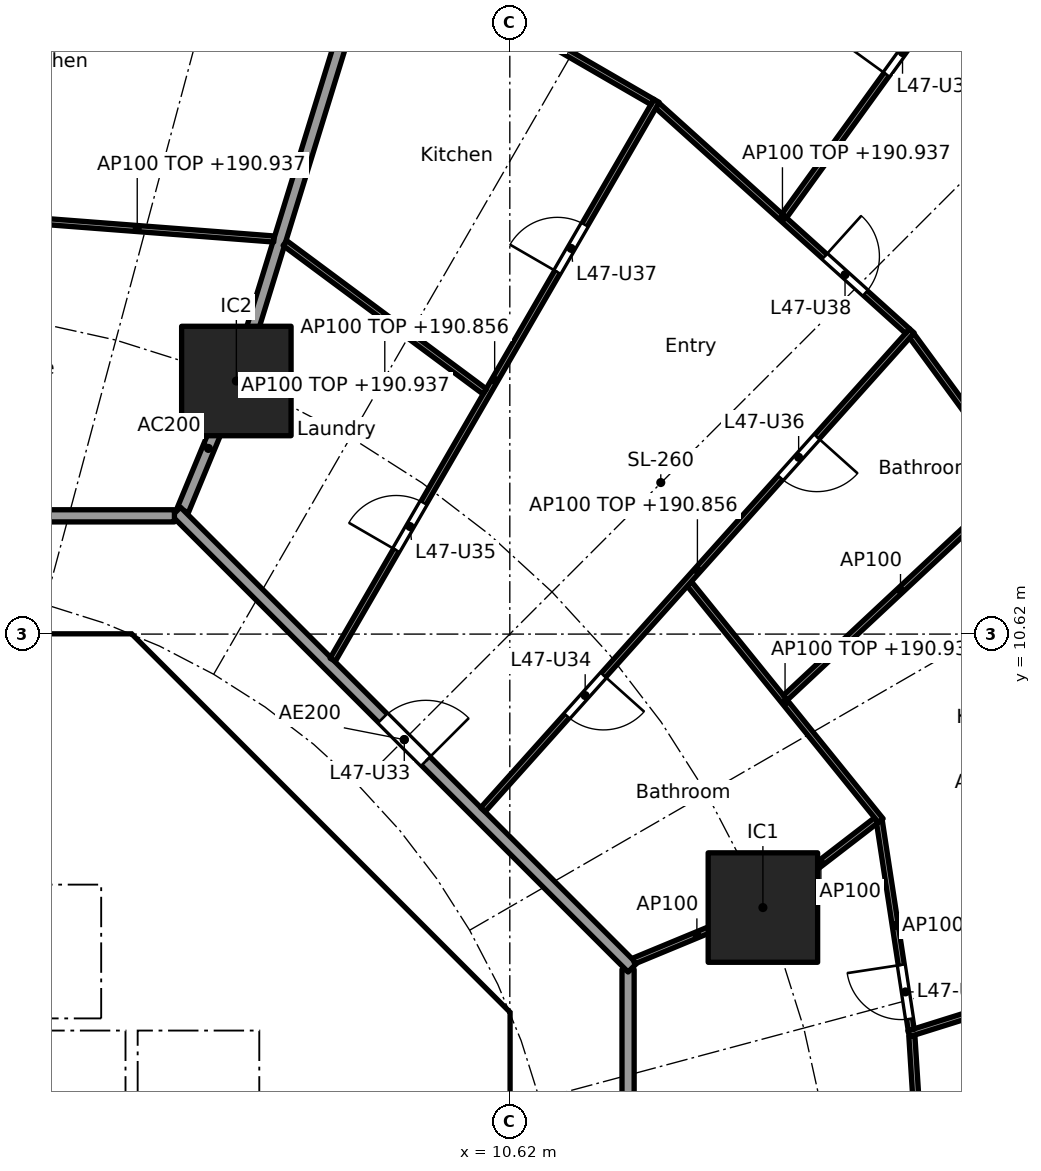
"""IFC4 building model, lengths in metres.
Left out: names, types, materials, properties, quantities, classifications, styles, units other than length and angle.
Written with IfcOpenShell. Run it as: python <this file> out.ifc"""

import sys

from ifc_helpers import new_model, si_unit, direction, frame, frame_2d, origin, origin_2d, place, context, subcontext, project, spatial, polyline, rectangle, outline, extrude, element, fill, save


model = new_model("IFC4")
c1 = context("Model", 3, precision=1e-05, world=origin(), true_north=direction((0.0, 1.0)))
c2 = subcontext(c1, "Body", "Model", "MODEL_VIEW")
j1 = project(units=[si_unit("LENGTHUNIT", "METRE"), si_unit("PLANEANGLEUNIT", "RADIAN")], contexts=[c1])
p1 = place(None, origin())
s1 = spatial("IfcSite", under=j1, at=p1, CompositionType="ELEMENT")
p2 = place(p1, origin())
s2 = spatial("IfcBuilding", under=s1, at=p2, CompositionType="ELEMENT")
p3 = place(p2, frame((0.0, 0.0, 188.1)))
s3 = spatial("IfcBuildingStorey", under=s2, at=p3, CompositionType="ELEMENT", Elevation=188.1)
for number, where, z_axis, x_axis in (
    (1, (14.782, 6.123, 0.0), (0.0, 0.0, 1.0), (1.0, 0.0, 0.0)),
    (2, (6.123, 14.782, 0.0), (0.0, 0.0, 1.0), (1.0, 0.0, 0.0)),
):
    element("IfcColumn", number, at=place(p3, frame(where, z_axis=z_axis, x_axis=x_axis)), inside=s3, PredefinedType="COLUMN", context=c2, shape_type="SweptSolid", body=[
        extrude(rectangle(XDim=1.8, YDim=1.8, at=origin_2d()), origin(), (0.0, 0.0, 1.0), 3.7),
    ])
p4 = place(p3, frame((9.988, 4.613, 0.0), z_axis=(0.0, 0.0, 1.0), x_axis=(-0.707106781187, 0.707106781187, 0.0)))
e3 = element("IfcWall", 3, at=p4, inside=s3, PredefinedType="SHEAR", context=c2, shape_type="SweptSolid", body=[
    extrude(rectangle(XDim=7.602, YDim=0.6, at=frame_2d((3.801, 0.0))), origin(), (0.0, 0.0, 1.0), 3.44),
])
p5 = place(p4, frame((3.201, 0.0, 0.0)))
e4 = element("IfcOpeningElement", 4, at=p5, cuts=e3, PredefinedType="OPENING", context=c2, shape_type="SweptSolid", body=[
    extrude(rectangle(XDim=1.2, YDim=2.1, at=frame_2d((0.6, 1.05))), frame((0.0, 0.31, 0.0), z_axis=(0.0, -1.0, 0.0), x_axis=(1.0, 0.0, 0.0)), (0.0, 0.0, 1.0), 0.62),
])
p6 = place(p3, frame((4.0, 4.3, 0.0), z_axis=(0.0, 0.0, 1.0), x_axis=(0.0, 1.0, 0.0)))
e5 = element("IfcWall", 5, at=p6, inside=s3, PredefinedType="SOLIDWALL", context=c2, shape_type="SweptSolid", body=[
    extrude(rectangle(XDim=2.2, YDim=0.2, at=frame_2d((1.1, 0.0))), origin(), (0.0, 0.0, 1.0), 3.44),
])
p7 = place(p6, frame((0.55, 0.0, 0.0)))
e6 = element("IfcOpeningElement", 6, at=p7, cuts=e5, PredefinedType="OPENING", context=c2, shape_type="SweptSolid", body=[
    extrude(rectangle(XDim=1.1, YDim=2.1, at=frame_2d((0.55, 1.05))), frame((0.0, 0.11, 0.0), z_axis=(0.0, -1.0, 0.0), x_axis=(1.0, 0.0, 0.0)), (0.0, 0.0, 1.0), 0.22),
])
p8 = place(p3, frame((6.7, 4.0, 0.0), z_axis=(0.0, 0.0, 1.0), x_axis=(1.0, 0.0, 0.0)))
e7 = element("IfcWall", 7, at=p8, inside=s3, PredefinedType="SOLIDWALL", context=c2, shape_type="SweptSolid", body=[
    extrude(rectangle(XDim=3.325, YDim=0.2, at=frame_2d((1.662, 0.0))), origin(), (0.0, 0.0, 1.0), 3.44),
])
p9 = place(p8, frame((1.25, 0.0, 0.0)))
e8 = element("IfcOpeningElement", 8, at=p9, cuts=e7, PredefinedType="OPENING", context=c2, shape_type="SweptSolid", body=[
    extrude(rectangle(XDim=1.1, YDim=2.1, at=frame_2d((0.55, 1.05))), frame((0.0, 0.11, 0.0), z_axis=(0.0, -1.0, 0.0), x_axis=(1.0, 0.0, 0.0)), (0.0, 0.0, 1.0), 0.22),
])
p10 = place(p3, frame((4.0, 7.025, 0.0), z_axis=(0.0, 0.0, 1.0), x_axis=(0.0, 1.0, 0.0)))
e9 = element("IfcWall", 9, at=p10, inside=s3, PredefinedType="SOLIDWALL", context=c2, shape_type="SweptSolid", body=[
    extrude(rectangle(XDim=3.0, YDim=0.2, at=frame_2d((1.5, 0.0))), origin(), (0.0, 0.0, 1.0), 3.44),
])
p11 = place(p10, frame((0.925, 0.0, 0.0)))
e10 = element("IfcOpeningElement", 10, at=p11, cuts=e9, PredefinedType="OPENING", context=c2, shape_type="SweptSolid", body=[
    extrude(rectangle(XDim=1.1, YDim=2.1, at=frame_2d((0.55, 1.05))), frame((0.0, 0.11, 0.0), z_axis=(0.0, -1.0, 0.0), x_axis=(1.0, 0.0, 0.0)), (0.0, 0.0, 1.0), 0.22),
])
p12 = place(p3, origin())
e11 = element("IfcWall", 11, at=p12, inside=s3, PredefinedType="SHEAR", context=c2, shape_type="SweptSolid", body=[
    extrude(outline(polyline([(-4.152, 10.025), (-4.401, 9.776), (-4.825, 10.2), (-4.401, 10.625), (4.401, 10.625), (4.825, 10.2), (4.401, 9.776), (4.152, 10.025), (-4.152, 10.025)])), origin(), (0.0, 0.0, 1.0), 3.44),
])
p13 = place(p3, origin())
e12 = element("IfcWall", 12, at=p13, inside=s3, PredefinedType="SHEAR", context=c2, shape_type="SweptSolid", body=[
    extrude(outline(polyline([(9.776, -4.401), (10.025, -4.152), (10.025, -3.801), (10.025, 4.152), (9.776, 4.401), (10.2, 4.825), (10.625, 4.401), (10.625, -4.401), (10.2, -4.825), (9.776, -4.401)])), origin(), (0.0, 0.0, 1.0), 3.44),
])
p14 = place(p3, origin())
e13 = element("IfcWall", 13, at=p14, inside=s3, PredefinedType="SOLIDWALL", context=c2, shape_type="SweptSolid", body=[
    extrude(outline(polyline([(-6.7, 4.3), (6.7, 4.3), (6.7, 2.1), (6.5, 2.1), (6.5, 4.1), (4.5, 4.1), (4.5, 2.1), (4.3, 2.1), (4.3, 4.1), (2.3, 4.1), (2.3, 2.1), (2.1, 2.1), (2.1, 4.1), (0.1, 4.1), (0.1, 2.1), (-0.1, 2.1), (-0.1, 4.1), (-2.1, 4.1), (-2.1, 2.1), (-2.3, 2.1), (-2.3, 4.1), (-6.5, 4.1), (-6.5, 2.1), (-6.7, 2.1), (-6.7, 4.3)])), origin(), (0.0, 0.0, 1.0), 3.44),
])
p15 = place(p3, origin())
e14 = element("IfcWall", 14, at=p15, inside=s3, PredefinedType="SOLIDWALL", context=c2, shape_type="SweptSolid", body=[
    extrude(outline(polyline([(4.1, 6.5), (-4.1, 6.5), (-4.1, 7.025), (4.1, 7.025), (4.1, 6.5)])), origin(), (0.0, 0.0, 1.0), 3.44),
])
p16 = place(p3, origin())
e15 = element("IfcWall", 15, at=p16, inside=s3, PredefinedType="SOLIDWALL", context=c2, shape_type="SweptSolid", body=[
    extrude(outline(polyline([(7.025, -3.9), (6.7, -3.9), (6.7, 3.9), (7.025, 3.9), (7.025, -3.9)])), origin(), (0.0, 0.0, 1.0), 3.44),
])
p17 = place(p3, frame((5.243, 12.657, 0.0), z_axis=(0.0, 0.0, 1.0), x_axis=(0.382747093259, 0.923853160736, 0.0)))
e16 = element("IfcWall", 16, at=p17, inside=s3, PredefinedType="PARTITIONING", context=c2, shape_type="SweptSolid", body=[
    extrude(rectangle(XDim=2.2, YDim=0.2, at=frame_2d((1.1, 0.0))), origin(), (0.0, 0.0, 1.0), 3.44),
])
p18 = place(p3, frame((6.138, 14.83, 0.0), z_axis=(0.0, 0.0, 1.0), x_axis=(0.294818517221, 0.955553264818, 0.0)))
e17 = element("IfcWall", 17, at=p18, inside=s3, PredefinedType="PARTITIONING", context=c2, shape_type="SweptSolid", body=[
    extrude(rectangle(XDim=12.619, YDim=0.2, at=frame_2d((6.31, 0.0))), origin(), (0.0, 0.0, 1.0), 2.837),
])
p19 = place(p3, frame((12.565, -5.104, 0.0), z_axis=(0.0, 0.0, 1.0), x_axis=(0.0, 1.0, 0.0)))
e18 = element("IfcWall", 18, at=p19, inside=s3, PredefinedType="PARTITIONING", context=c2, shape_type="SweptSolid", body=[
    extrude(rectangle(XDim=10.209, YDim=0.2, at=frame_2d((5.104, 0.0))), origin(), (0.0, 0.0, 1.0), 3.44),
])
p20 = place(p3, frame((12.635, 5.134, 0.0), z_axis=(0.0, 0.0, 1.0), x_axis=(-0.707106781187, 0.707106781187, 0.0)))
e19 = element("IfcWall", 19, at=p20, inside=s3, PredefinedType="PARTITIONING", context=c2, shape_type="SweptSolid", body=[
    extrude(rectangle(XDim=10.609, YDim=0.2, at=frame_2d((5.305, 0.0))), origin(), (0.0, 0.0, 1.0), 3.44),
])
p21 = place(p20, frame((4.804, 0.0, 0.0)))
e20 = element("IfcOpeningElement", 20, at=p21, cuts=e19, PredefinedType="OPENING", context=c2, shape_type="SweptSolid", body=[
    extrude(rectangle(XDim=1.0, YDim=2.1, at=frame_2d((0.5, 1.05))), frame((0.0, 0.11, 0.0), z_axis=(0.0, -1.0, 0.0), x_axis=(1.0, 0.0, 0.0)), (0.0, 0.0, 1.0), 0.22),
])
p22 = place(p3, frame((5.104, 12.565, 0.0), z_axis=(0.0, 0.0, 1.0), x_axis=(-1.0, 0.0, 0.0)))
e21 = element("IfcWall", 21, at=p22, inside=s3, PredefinedType="PARTITIONING", context=c2, shape_type="SweptSolid", body=[
    extrude(rectangle(XDim=10.409, YDim=0.2, at=frame_2d((5.205, 0.0))), origin(), (0.0, 0.0, 1.0), 3.44),
])
p23 = place(p22, frame((6.339, 0.0, 0.0)))
e22 = element("IfcOpeningElement", 22, at=p23, cuts=e21, PredefinedType="OPENING", context=c2, shape_type="SweptSolid", body=[
    extrude(rectangle(XDim=1.0, YDim=2.1, at=frame_2d((0.5, 1.05))), frame((0.0, 0.11, 0.0), z_axis=(0.0, -1.0, 0.0), x_axis=(1.0, 0.0, 0.0)), (0.0, 0.0, 1.0), 0.22),
])
p24 = place(p3, frame((17.485, 0.05, 0.0), z_axis=(0.0, 0.0, 1.0), x_axis=(-0.063679314345, 0.99797041285, 0.0)))
e23 = element("IfcWall", 23, at=p24, inside=s3, PredefinedType="PARTITIONING", context=c2, shape_type="SweptSolid", body=[
    extrude(rectangle(XDim=3.972, YDim=0.1, at=frame_2d((1.986, 0.0))), origin(), (0.0, 0.0, 1.0), 2.837),
])
p25 = place(p3, frame((17.181, 4.049, 0.0), z_axis=(0.0, 0.0, 1.0), x_axis=(0.954246359918, 0.299021545351, 0.0)))
e24 = element("IfcWall", 24, at=p25, inside=s3, PredefinedType="PARTITIONING", context=c2, shape_type="SweptSolid", body=[
    extrude(rectangle(XDim=5.213, YDim=0.1, at=frame_2d((2.606, 0.0))), origin(), (0.0, 0.0, 1.0), 3.44),
])
p26 = place(p3, frame((17.221, 4.113, 0.0), z_axis=(0.0, 0.0, 1.0), x_axis=(-0.151078880423, 0.988521710379, 0.0)))
e25 = element("IfcWall", 25, at=p26, inside=s3, PredefinedType="PARTITIONING", context=c2, shape_type="SweptSolid", body=[
    extrude(rectangle(XDim=3.469, YDim=0.1, at=frame_2d((1.735, 0.0))), origin(), (0.0, 0.0, 1.0), 2.837),
])
p27 = place(p26, frame((0.18, 0.0, 0.0)))
e26 = element("IfcOpeningElement", 26, at=p27, cuts=e25, PredefinedType="OPENING", context=c2, shape_type="SweptSolid", body=[
    extrude(rectangle(XDim=0.9, YDim=2.1, at=frame_2d((0.45, 1.05))), frame((0.0, 0.06, 0.0), z_axis=(0.0, -1.0, 0.0), x_axis=(1.0, 0.0, 0.0)), (0.0, 0.0, 1.0), 0.12),
])
p28 = place(p3, frame((12.657, 5.243, 0.0), z_axis=(0.0, 0.0, 1.0), x_axis=(0.923826362943, 0.382811769845, 0.0)))
e27 = element("IfcWall", 27, at=p28, inside=s3, PredefinedType="PARTITIONING", context=c2, shape_type="SweptSolid", body=[
    extrude(rectangle(XDim=2.25, YDim=0.1, at=frame_2d((1.125, 0.0))), origin(), (0.0, 0.0, 1.0), 3.44),
])
p29 = place(p3, frame((14.822, 6.154, 0.0), z_axis=(0.0, 0.0, 1.0), x_axis=(0.792226528082, 0.610227111987, 0.0)))
e28 = element("IfcWall", 28, at=p29, inside=s3, PredefinedType="PARTITIONING", context=c2, shape_type="SweptSolid", body=[
    extrude(rectangle(XDim=2.307, YDim=0.1, at=frame_2d((1.154, 0.0))), origin(), (0.0, 0.0, 1.0), 3.44),
])
p30 = place(p3, frame((16.721, 7.553, 0.0), z_axis=(0.0, 0.0, 1.0), x_axis=(-0.628753513808, 0.777604667472, 0.0)))
e29 = element("IfcWall", 29, at=p30, inside=s3, PredefinedType="PARTITIONING", context=c2, shape_type="SweptSolid", body=[
    extrude(rectangle(XDim=5.007, YDim=0.1, at=frame_2d((2.504, 0.0))), origin(), (0.0, 0.0, 1.0), 2.837),
])
p31 = place(p3, frame((20.781, 10.681, 0.0), z_axis=(0.0, 0.0, 1.0), x_axis=(-0.591117075283, 0.806585769345, 0.0)))
e30 = element("IfcWall", 30, at=p31, inside=s3, PredefinedType="PARTITIONING", context=c2, shape_type="SweptSolid", body=[
    extrude(rectangle(XDim=6.01, YDim=0.1, at=frame_2d((3.005, 0.0))), origin(), (0.0, 0.0, 1.0), 2.837),
])
p32 = place(p31, frame((1.103, 0.0, 0.0)))
e31 = element("IfcOpeningElement", 31, at=p32, cuts=e30, PredefinedType="OPENING", context=c2, shape_type="SweptSolid", body=[
    extrude(rectangle(XDim=0.9, YDim=2.1, at=frame_2d((0.45, 1.05))), frame((0.0, 0.06, 0.0), z_axis=(0.0, -1.0, 0.0), x_axis=(1.0, 0.0, 0.0)), (0.0, 0.0, 1.0), 0.12),
])
p33 = place(p3, frame((15.152, 9.573, 0.0), z_axis=(0.0, 0.0, 1.0), x_axis=(0.730723083214, 0.682673989294, 0.0)))
e32 = element("IfcWall", 32, at=p33, inside=s3, PredefinedType="PARTITIONING", context=c2, shape_type="SweptSolid", body=[
    extrude(rectangle(XDim=5.183, YDim=0.1, at=frame_2d((2.591, 0.0))), origin(), (0.0, 0.0, 1.0), 3.44),
])
p34 = place(p3, frame((10.178, 7.732, 0.0), z_axis=(0.0, 0.0, 1.0), x_axis=(0.667280084362, 0.744806880348, 0.0)))
e33 = element("IfcWall", 33, at=p34, inside=s3, PredefinedType="PARTITIONING", context=c2, shape_type="SweptSolid", body=[
    extrude(rectangle(XDim=10.572, YDim=0.1, at=frame_2d((5.286, 0.0))), origin(), (0.0, 0.0, 1.0), 2.756),
])
p35 = place(p34, frame((2.07, 0.0, 0.0)))
e34 = element("IfcOpeningElement", 34, at=p35, cuts=e33, PredefinedType="OPENING", context=c2, shape_type="SweptSolid", body=[
    extrude(rectangle(XDim=0.9, YDim=2.1, at=frame_2d((0.45, 1.05))), frame((0.0, 0.06, 0.0), z_axis=(0.0, -1.0, 0.0), x_axis=(1.0, 0.0, 0.0)), (0.0, 0.0, 1.0), 0.12),
])
p36 = place(p34, frame((7.331, 0.0, 0.0)))
e35 = element("IfcOpeningElement", 35, at=p36, cuts=e33, PredefinedType="OPENING", context=c2, shape_type="SweptSolid", body=[
    extrude(rectangle(XDim=0.9, YDim=2.1, at=frame_2d((0.45, 1.05))), frame((0.0, 0.06, 0.0), z_axis=(0.0, -1.0, 0.0), x_axis=(1.0, 0.0, 0.0)), (0.0, 0.0, 1.0), 0.12),
])
p37 = place(p3, frame((17.162, 15.603, 0.0), z_axis=(0.0, 0.0, 1.0), x_axis=(-0.742790086539, 0.66952437397, 0.0)))
e36 = element("IfcWall", 36, at=p37, inside=s3, PredefinedType="PARTITIONING", context=c2, shape_type="SweptSolid", body=[
    extrude(rectangle(XDim=5.542, YDim=0.1, at=frame_2d((2.771, 0.0))), origin(), (0.0, 0.0, 1.0), 2.837),
])
p38 = place(p37, frame((0.935, 0.0, 0.0)))
e37 = element("IfcOpeningElement", 37, at=p38, cuts=e36, PredefinedType="OPENING", context=c2, shape_type="SweptSolid", body=[
    extrude(rectangle(XDim=0.9, YDim=2.1, at=frame_2d((0.45, 1.05))), frame((0.0, 0.06, 0.0), z_axis=(0.0, -1.0, 0.0), x_axis=(1.0, 0.0, 0.0)), (0.0, 0.0, 1.0), 0.12),
])
p39 = place(p3, frame((15.133, 17.498, 0.0), z_axis=(0.0, 0.0, 1.0), x_axis=(0.586223556927, 0.810149332718, 0.0)))
e38 = element("IfcWall", 38, at=p39, inside=s3, PredefinedType="PARTITIONING", context=c2, shape_type="SweptSolid", body=[
    extrude(rectangle(XDim=6.638, YDim=0.1, at=frame_2d((3.319, 0.0))), origin(), (0.0, 0.0, 1.0), 2.905),
])
p40 = place(p39, frame((2.869, 0.0, 0.0)))
e39 = element("IfcOpeningElement", 39, at=p40, cuts=e38, PredefinedType="OPENING", context=c2, shape_type="SweptSolid", body=[
    extrude(rectangle(XDim=0.9, YDim=2.1, at=frame_2d((0.45, 1.05))), frame((0.0, 0.06, 0.0), z_axis=(0.0, -1.0, 0.0), x_axis=(1.0, 0.0, 0.0)), (0.0, 0.0, 1.0), 0.12),
])
p41 = place(p3, frame((7.708, 10.198, 0.0), z_axis=(0.0, 0.0, 1.0), x_axis=(0.501288100085, 0.865280440501, 0.0)))
e40 = element("IfcWall", 40, at=p41, inside=s3, PredefinedType="PARTITIONING", context=c2, shape_type="SweptSolid", body=[
    extrude(rectangle(XDim=10.623, YDim=0.1, at=frame_2d((5.312, 0.0))), origin(), (0.0, 0.0, 1.0), 2.756),
])
p42 = place(p41, frame((2.082, 0.0, 0.0)))
e41 = element("IfcOpeningElement", 41, at=p42, cuts=e40, PredefinedType="OPENING", context=c2, shape_type="SweptSolid", body=[
    extrude(rectangle(XDim=0.9, YDim=2.1, at=frame_2d((0.45, 1.05))), frame((0.0, 0.06, 0.0), z_axis=(0.0, -1.0, 0.0), x_axis=(1.0, 0.0, 0.0)), (0.0, 0.0, 1.0), 0.12),
])
p43 = place(p41, frame((7.369, 0.0, 0.0)))
e42 = element("IfcOpeningElement", 42, at=p43, cuts=e40, PredefinedType="OPENING", context=c2, shape_type="SweptSolid", body=[
    extrude(rectangle(XDim=0.9, YDim=2.1, at=frame_2d((0.45, 1.05))), frame((0.0, 0.06, 0.0), z_axis=(0.0, -1.0, 0.0), x_axis=(1.0, 0.0, 0.0)), (0.0, 0.0, 1.0), 0.12),
])
p44 = place(p3, frame((10.207, 14.61, 0.0), z_axis=(0.0, 0.0, 1.0), x_axis=(-0.802769141821, 0.596289950394, 0.0)))
e43 = element("IfcWall", 43, at=p44, inside=s3, PredefinedType="PARTITIONING", context=c2, shape_type="SweptSolid", body=[
    extrude(rectangle(XDim=4.092, YDim=0.1, at=frame_2d((2.046, 0.0))), origin(), (0.0, 0.0, 1.0), 2.837),
])
p45 = place(p3, frame((12.965, 19.371, 0.0), z_axis=(0.0, 0.0, 1.0), x_axis=(-0.865286427811, 0.501277765163, 0.0)))
e44 = element("IfcWall", 44, at=p45, inside=s3, PredefinedType="PARTITIONING", context=c2, shape_type="SweptSolid", body=[
    extrude(rectangle(XDim=5.22, YDim=0.1, at=frame_2d((2.61, 0.0))), origin(), (0.0, 0.0, 1.0), 2.837),
])
p46 = place(p3, frame((6.741, 17.117, 0.0), z_axis=(0.0, 0.0, 1.0), x_axis=(-0.997078320723, 0.076386008825, 0.0)))
e45 = element("IfcWall", 45, at=p46, inside=s3, PredefinedType="PARTITIONING", context=c2, shape_type="SweptSolid", body=[
    extrude(rectangle(XDim=4.51, YDim=0.1, at=frame_2d((2.255, 0.0))), origin(), (0.0, 0.0, 1.0), 2.837),
])
p47 = place(p7, origin())
e46 = element("IfcDoor", 46, at=p47, inside=s3, OperationType="DOUBLE_DOOR_SLIDING", PredefinedType="DOOR", context=c2, shape_type="SweptSolid", body=[
    extrude(rectangle(XDim=1.1, YDim=2.1, at=frame_2d((0.55, 1.05))), frame((0.0, 0.025, 0.0), z_axis=(0.0, -1.0, 0.0), x_axis=(1.0, 0.0, 0.0)), (0.0, 0.0, 1.0), 0.05),
])
fill(e6, e46)
p48 = place(p9, frame((1.1, 0.0, 0.0), x_axis=(-1.0, 0.0, 0.0)))
e47 = element("IfcDoor", 47, at=p48, inside=s3, OperationType="SINGLE_SWING_LEFT", PredefinedType="DOOR", context=c2, shape_type="SweptSolid", body=[
    extrude(rectangle(XDim=1.1, YDim=2.1, at=frame_2d((0.55, 1.05))), frame((0.0, 0.025, 0.0), z_axis=(0.0, -1.0, 0.0), x_axis=(1.0, 0.0, 0.0)), (0.0, 0.0, 1.0), 0.05),
])
fill(e8, e47)
p49 = place(p11, origin())
e48 = element("IfcDoor", 48, at=p49, inside=s3, OperationType="SINGLE_SWING_RIGHT", PredefinedType="DOOR", context=c2, shape_type="SweptSolid", body=[
    extrude(rectangle(XDim=1.1, YDim=2.1, at=frame_2d((0.55, 1.05))), frame((0.0, 0.025, 0.0), z_axis=(0.0, -1.0, 0.0), x_axis=(1.0, 0.0, 0.0)), (0.0, 0.0, 1.0), 0.05),
])
fill(e10, e48)
p50 = place(p5, origin())
e49 = element("IfcDoor", 49, at=p50, inside=s3, OperationType="SINGLE_SWING_RIGHT", PredefinedType="DOOR", context=c2, shape_type="SweptSolid", body=[
    extrude(rectangle(XDim=1.2, YDim=2.1, at=frame_2d((0.6, 1.05))), frame((0.0, 0.025, 0.0), z_axis=(0.0, -1.0, 0.0), x_axis=(1.0, 0.0, 0.0)), (0.0, 0.0, 1.0), 0.05),
])
fill(e4, e49)
p51 = place(p21, frame((1.0, 0.0, 0.0), x_axis=(-1.0, 0.0, 0.0)))
e50 = element("IfcDoor", 50, at=p51, inside=s3, OperationType="SINGLE_SWING_RIGHT", PredefinedType="DOOR", context=c2, shape_type="SweptSolid", body=[
    extrude(rectangle(XDim=1.0, YDim=2.1, at=frame_2d((0.5, 1.05))), frame((0.0, 0.025, 0.0), z_axis=(0.0, -1.0, 0.0), x_axis=(1.0, 0.0, 0.0)), (0.0, 0.0, 1.0), 0.05),
])
fill(e20, e50)
p52 = place(p35, frame((0.9, 0.0, 0.0), x_axis=(-1.0, 0.0, 0.0)))
e51 = element("IfcDoor", 51, at=p52, inside=s3, OperationType="SINGLE_SWING_LEFT", PredefinedType="DOOR", context=c2, shape_type="SweptSolid", body=[
    extrude(rectangle(XDim=0.9, YDim=2.1, at=frame_2d((0.45, 1.05))), frame((0.0, 0.025, 0.0), z_axis=(0.0, -1.0, 0.0), x_axis=(1.0, 0.0, 0.0)), (0.0, 0.0, 1.0), 0.05),
])
fill(e34, e51)
p53 = place(p42, origin())
e52 = element("IfcDoor", 52, at=p53, inside=s3, OperationType="SINGLE_SWING_LEFT", PredefinedType="DOOR", context=c2, shape_type="SweptSolid", body=[
    extrude(rectangle(XDim=0.9, YDim=2.1, at=frame_2d((0.45, 1.05))), frame((0.0, 0.025, 0.0), z_axis=(0.0, -1.0, 0.0), x_axis=(1.0, 0.0, 0.0)), (0.0, 0.0, 1.0), 0.05),
])
fill(e41, e52)
p54 = place(p36, frame((0.9, 0.0, 0.0), x_axis=(-1.0, 0.0, 0.0)))
e53 = element("IfcDoor", 53, at=p54, inside=s3, OperationType="SINGLE_SWING_LEFT", PredefinedType="DOOR", context=c2, shape_type="SweptSolid", body=[
    extrude(rectangle(XDim=0.9, YDim=2.1, at=frame_2d((0.45, 1.05))), frame((0.0, 0.025, 0.0), z_axis=(0.0, -1.0, 0.0), x_axis=(1.0, 0.0, 0.0)), (0.0, 0.0, 1.0), 0.05),
])
fill(e35, e53)
p55 = place(p43, origin())
e54 = element("IfcDoor", 54, at=p55, inside=s3, OperationType="SINGLE_SWING_LEFT", PredefinedType="DOOR", context=c2, shape_type="SweptSolid", body=[
    extrude(rectangle(XDim=0.9, YDim=2.1, at=frame_2d((0.45, 1.05))), frame((0.0, 0.025, 0.0), z_axis=(0.0, -1.0, 0.0), x_axis=(1.0, 0.0, 0.0)), (0.0, 0.0, 1.0), 0.05),
])
fill(e42, e54)
p56 = place(p38, frame((0.9, 0.0, 0.0), x_axis=(-1.0, 0.0, 0.0)))
e55 = element("IfcDoor", 55, at=p56, inside=s3, OperationType="SINGLE_SWING_LEFT", PredefinedType="DOOR", context=c2, shape_type="SweptSolid", body=[
    extrude(rectangle(XDim=0.9, YDim=2.1, at=frame_2d((0.45, 1.05))), frame((0.0, 0.025, 0.0), z_axis=(0.0, -1.0, 0.0), x_axis=(1.0, 0.0, 0.0)), (0.0, 0.0, 1.0), 0.05),
])
fill(e37, e55)
p57 = place(p40, origin())
e56 = element("IfcDoor", 56, at=p57, inside=s3, OperationType="SINGLE_SWING_LEFT", PredefinedType="DOOR", context=c2, shape_type="SweptSolid", body=[
    extrude(rectangle(XDim=0.9, YDim=2.1, at=frame_2d((0.45, 1.05))), frame((0.0, 0.025, 0.0), z_axis=(0.0, -1.0, 0.0), x_axis=(1.0, 0.0, 0.0)), (0.0, 0.0, 1.0), 0.05),
])
fill(e39, e56)
p58 = place(p27, origin())
e57 = element("IfcDoor", 57, at=p58, inside=s3, OperationType="SINGLE_SWING_RIGHT", PredefinedType="DOOR", context=c2, shape_type="SweptSolid", body=[
    extrude(rectangle(XDim=0.9, YDim=2.1, at=frame_2d((0.45, 1.05))), frame((0.0, 0.025, 0.0), z_axis=(0.0, -1.0, 0.0), x_axis=(1.0, 0.0, 0.0)), (0.0, 0.0, 1.0), 0.05),
])
fill(e26, e57)
save(model, sys.argv[1])
